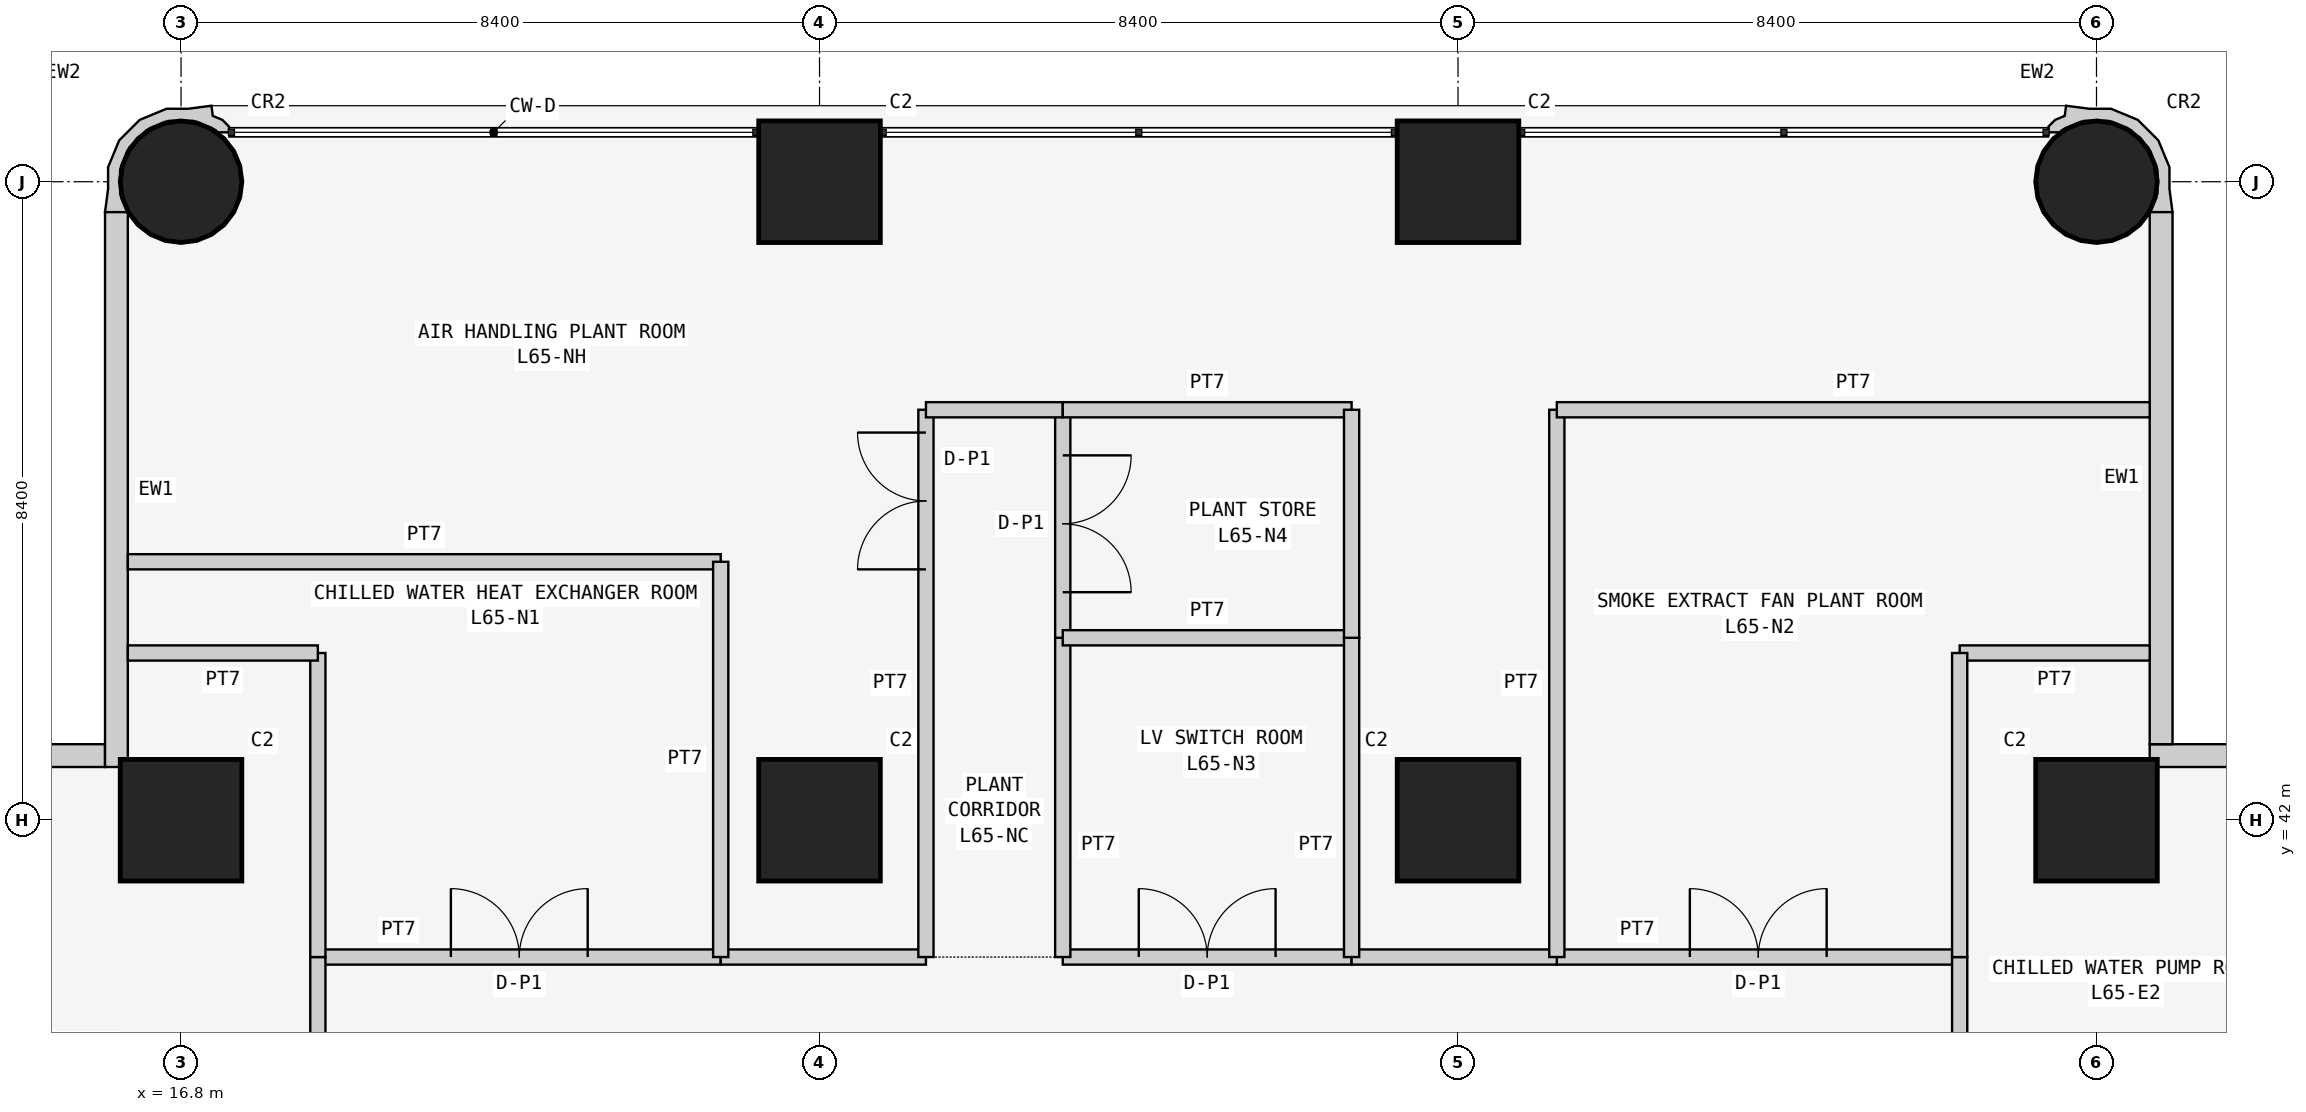
"""IFC4 building model, lengths in metres.
Left out: names, types, materials, properties, quantities, classifications, styles, units other than length and angle.
Written with IfcOpenShell. Run it as: python <this file> out.ifc"""

import sys

from ifc_helpers import new_model, si_unit, direction, frame, frame_2d, origin, origin_2d, place, context, subcontext, project, spatial, polyline, rectangle, circle, outline, extrude, element, fill, save


model = new_model("IFC4")
c1 = context("Model", 3, precision=1e-05, world=origin(), true_north=direction((0.0, 1.0)))
c2 = subcontext(c1, "Body", "Model", "MODEL_VIEW")
j1 = project(units=[si_unit("LENGTHUNIT", "METRE"), si_unit("PLANEANGLEUNIT", "RADIAN")], contexts=[c1])
p1 = place(None, origin())
s1 = spatial("IfcSite", under=j1, at=p1, CompositionType="ELEMENT")
p2 = place(p1, origin())
s2 = spatial("IfcBuilding", under=s1, at=p2, CompositionType="ELEMENT")
p3 = place(p2, frame((0.0, 0.0, 248.1)))
s3 = spatial("IfcBuildingStorey", under=s2, at=p3, CompositionType="ELEMENT", Elevation=248.1)
p4 = place(p3, frame((16.8, 42.0, 0.0), z_axis=(0.0, 0.0, 1.0), x_axis=(1.0, 0.0, 0.0)))
e1 = element("IfcColumn", 1, at=p4, inside=s3, PredefinedType="COLUMN", context=c2, shape_type="SweptSolid", body=[
    extrude(rectangle(XDim=1.6, YDim=1.6, at=origin_2d()), origin(), (0.0, 0.0, 1.0), 6.0),
])
p5 = place(p3, frame((16.8, 50.4, 0.0), z_axis=(0.0, 0.0, 1.0), x_axis=(1.0, 0.0, 0.0)))
e2 = element("IfcColumn", 2, at=p5, inside=s3, PredefinedType="COLUMN", context=c2, shape_type="SweptSolid", body=[
    extrude(circle(Radius=0.8, at=origin_2d()), origin(), (0.0, 0.0, 1.0), 6.0),
])
for number, where, z_axis, x_axis in (
    (3, (25.2, 42.0, 0.0), (0.0, 0.0, 1.0), (1.0, 0.0, 0.0)),
    (4, (25.2, 50.4, 0.0), (0.0, 0.0, 1.0), (1.0, 0.0, 0.0)),
    (5, (33.6, 42.0, 0.0), (0.0, 0.0, 1.0), (1.0, 0.0, 0.0)),
    (6, (33.6, 50.4, 0.0), (0.0, 0.0, 1.0), (1.0, 0.0, 0.0)),
    (7, (42.0, 42.0, 0.0), (0.0, 0.0, 1.0), (1.0, 0.0, 0.0)),
):
    element("IfcColumn", number, at=place(p3, frame(where, z_axis=z_axis, x_axis=x_axis)), inside=s3, PredefinedType="COLUMN", context=c2, shape_type="SweptSolid", body=[
        extrude(rectangle(XDim=1.6, YDim=1.6, at=origin_2d()), origin(), (0.0, 0.0, 1.0), 6.0),
    ])
p6 = place(p3, frame((42.0, 50.4, 0.0), z_axis=(0.0, 0.0, 1.0), x_axis=(1.0, 0.0, 0.0)))
e8 = element("IfcColumn", 8, at=p6, inside=s3, PredefinedType="COLUMN", context=c2, shape_type="SweptSolid", body=[
    extrude(circle(Radius=0.8, at=origin_2d()), origin(), (0.0, 0.0, 1.0), 6.0),
])
p7 = place(p3, frame((15.8, 42.85, 0.0), z_axis=(0.0, 0.0, 1.0), x_axis=(-1.0, 0.0, 0.0)))
e9 = element("IfcWall", 9, at=p7, inside=s3, PredefinedType="SOLIDWALL", context=c2, shape_type="SweptSolid", body=[
    extrude(rectangle(XDim=15.4, YDim=0.3, at=frame_2d((7.7, 0.0))), origin(), (0.0, 0.0, 1.0), 5.85),
])
p8 = place(p3, frame((50.0, 42.85, 0.0), z_axis=(0.0, 0.0, 1.0), x_axis=(-1.0, 0.0, 0.0)))
e10 = element("IfcWall", 10, at=p8, inside=s3, PredefinedType="SOLIDWALL", context=c2, shape_type="SweptSolid", body=[
    extrude(rectangle(XDim=7.3, YDim=0.3, at=frame_2d((3.65, 0.0))), origin(), (0.0, 0.0, 1.0), 5.85),
])
p9 = place(p3, frame((42.85, 43.0, 0.0), z_axis=(0.0, 0.0, 1.0), x_axis=(0.0, 1.0, 0.0)))
e11 = element("IfcWall", 11, at=p9, inside=s3, PredefinedType="SOLIDWALL", context=c2, shape_type="SweptSolid", body=[
    extrude(rectangle(XDim=7.0, YDim=0.3, at=frame_2d((3.5, 0.0))), origin(), (0.0, 0.0, 1.0), 5.85),
])
p10 = place(p3, frame((15.95, 50.0, 0.0), z_axis=(0.0, 0.0, 1.0), x_axis=(0.0, -1.0, 0.0)))
e12 = element("IfcWall", 12, at=p10, inside=s3, PredefinedType="SOLIDWALL", context=c2, shape_type="SweptSolid", body=[
    extrude(rectangle(XDim=7.3, YDim=0.3, at=frame_2d((3.65, 0.0))), origin(), (0.0, 0.0, 1.0), 5.85),
])
p11 = place(p3, frame((42.817, 50.073, 0.0), z_axis=(0.0, 0.0, 1.0), x_axis=(0.34958262992, 0.936905536785, 0.0)))
e13 = element("IfcWall", 13, at=p11, inside=s3, PredefinedType="SOLIDWALL", context=c2, shape_type="SweptSolid", body=[
    extrude(outline(polyline([(0.266, -0.053), (0.535, 0.047), (0.815, 0.307), (0.973, 0.655), (0.987, 1.037), (0.886, 1.306), (0.818, 1.604), (0.686, 1.574), (0.593, 1.674), (0.481, 1.725), (0.409, 1.698), (0.461, 1.559), (0.498, 1.542), (0.715, 1.309), (0.827, 1.011), (0.815, 0.692), (0.683, 0.402), (0.45, 0.185), (0.151, 0.074), (-0.117, 0.083), (-0.128, 0.077), (-0.147, 0.07), (-0.005, -0.197), (0.266, -0.053)])), origin(), (0.0, 0.0, 1.0), 5.85),
])
p12 = place(p3, frame((17.377, 51.065, 0.0), z_axis=(0.0, 0.0, 1.0), x_axis=(-0.34958262992, 0.936905536785, 0.0)))
e14 = element("IfcWall", 14, at=p12, inside=s3, PredefinedType="SOLIDWALL", context=c2, shape_type="SweptSolid", body=[
    extrude(outline(polyline([(0.151, -0.021), (0.244, 0.079), (0.376, 0.048), (0.445, 0.347), (0.545, 0.616), (0.532, 0.998), (0.373, 1.345), (0.094, 1.605), (-0.176, 1.706), (-0.446, 1.849), (-0.588, 1.582), (-0.57, 1.575), (-0.558, 1.569), (-0.29, 1.579), (0.008, 1.467), (0.242, 1.25), (0.374, 0.961), (0.385, 0.642), (0.274, 0.344), (0.057, 0.11), (0.019, 0.093), (-0.033, -0.046), (0.039, -0.072), (0.151, -0.021)])), origin(), (0.0, 0.0, 1.0), 5.85),
])
p13 = place(p3, frame((18.6, 40.2, 0.0), z_axis=(0.0, 0.0, 1.0), x_axis=(1.0, 0.0, 0.0)))
e15 = element("IfcWall", 15, at=p13, inside=s3, PredefinedType="PARTITIONING", context=c2, shape_type="SweptSolid", body=[
    extrude(rectangle(XDim=5.3, YDim=0.2, at=frame_2d((2.65, 0.0))), origin(), (0.0, 0.0, 1.0), 5.85),
])
p14 = place(p13, frame((1.75, 0.0, 0.0)))
e16 = element("IfcOpeningElement", 16, at=p14, cuts=e15, PredefinedType="OPENING", context=c2, shape_type="SweptSolid", body=[
    extrude(rectangle(XDim=1.8, YDim=2.4, at=frame_2d((0.9, 1.2))), frame((0.0, 0.11, 0.0), z_axis=(0.0, -1.0, 0.0), x_axis=(1.0, 0.0, 0.0)), (0.0, 0.0, 1.0), 0.22),
])
p15 = place(p3, frame((34.9, 40.2, 0.0), z_axis=(0.0, 0.0, 1.0), x_axis=(1.0, 0.0, 0.0)))
e17 = element("IfcWall", 17, at=p15, inside=s3, PredefinedType="PARTITIONING", context=c2, shape_type="SweptSolid", body=[
    extrude(rectangle(XDim=5.3, YDim=0.2, at=frame_2d((2.65, 0.0))), origin(), (0.0, 0.0, 1.0), 5.85),
])
p16 = place(p15, frame((1.75, 0.0, 0.0)))
e18 = element("IfcOpeningElement", 18, at=p16, cuts=e17, PredefinedType="OPENING", context=c2, shape_type="SweptSolid", body=[
    extrude(rectangle(XDim=1.8, YDim=2.4, at=frame_2d((0.9, 1.2))), frame((0.0, 0.11, 0.0), z_axis=(0.0, -1.0, 0.0), x_axis=(1.0, 0.0, 0.0)), (0.0, 0.0, 1.0), 0.22),
])
p17 = place(p3, frame((28.4, 40.2, 0.0), z_axis=(0.0, 0.0, 1.0), x_axis=(1.0, 0.0, 0.0)))
e19 = element("IfcWall", 19, at=p17, inside=s3, PredefinedType="PARTITIONING", context=c2, shape_type="SweptSolid", body=[
    extrude(rectangle(XDim=3.8, YDim=0.2, at=frame_2d((1.9, 0.0))), origin(), (0.0, 0.0, 1.0), 5.85),
])
p18 = place(p17, frame((1.0, 0.0, 0.0)))
e20 = element("IfcOpeningElement", 20, at=p18, cuts=e19, PredefinedType="OPENING", context=c2, shape_type="SweptSolid", body=[
    extrude(rectangle(XDim=1.8, YDim=2.4, at=frame_2d((0.9, 1.2))), frame((0.0, 0.11, 0.0), z_axis=(0.0, -1.0, 0.0), x_axis=(1.0, 0.0, 0.0)), (0.0, 0.0, 1.0), 0.22),
])
p19 = place(p3, frame((23.9, 40.2, 0.0), z_axis=(0.0, 0.0, 1.0), x_axis=(1.0, 0.0, 0.0)))
e21 = element("IfcWall", 21, at=p19, inside=s3, PredefinedType="PARTITIONING", context=c2, shape_type="SweptSolid", body=[
    extrude(rectangle(XDim=2.7, YDim=0.2, at=frame_2d((1.35, 0.0))), origin(), (0.0, 0.0, 1.0), 5.85),
])
p20 = place(p3, frame((32.2, 40.2, 0.0), z_axis=(0.0, 0.0, 1.0), x_axis=(1.0, 0.0, 0.0)))
e22 = element("IfcWall", 22, at=p20, inside=s3, PredefinedType="PARTITIONING", context=c2, shape_type="SweptSolid", body=[
    extrude(rectangle(XDim=2.7, YDim=0.2, at=frame_2d((1.35, 0.0))), origin(), (0.0, 0.0, 1.0), 5.85),
])
p21 = place(p3, frame((40.2, 40.2, 0.0), z_axis=(0.0, 0.0, 1.0), x_axis=(0.0, -1.0, 0.0)))
e23 = element("IfcWall", 23, at=p21, inside=s3, PredefinedType="PARTITIONING", context=c2, shape_type="SweptSolid", body=[
    extrude(rectangle(XDim=5.3, YDim=0.2, at=frame_2d((2.65, 0.0))), origin(), (0.0, 0.0, 1.0), 5.85),
])
p22 = place(p21, frame((1.75, 0.0, 0.0)))
e24 = element("IfcOpeningElement", 24, at=p22, cuts=e23, PredefinedType="OPENING", context=c2, shape_type="SweptSolid", body=[
    extrude(rectangle(XDim=1.8, YDim=2.4, at=frame_2d((0.9, 1.2))), frame((0.0, 0.11, 0.0), z_axis=(0.0, -1.0, 0.0), x_axis=(1.0, 0.0, 0.0)), (0.0, 0.0, 1.0), 0.22),
])
p23 = place(p3, frame((18.6, 34.9, 0.0), z_axis=(0.0, 0.0, 1.0), x_axis=(0.0, 1.0, 0.0)))
e25 = element("IfcWall", 25, at=p23, inside=s3, PredefinedType="PARTITIONING", context=c2, shape_type="SweptSolid", body=[
    extrude(rectangle(XDim=5.3, YDim=0.2, at=frame_2d((2.65, 0.0))), origin(), (0.0, 0.0, 1.0), 5.85),
])
p24 = place(p23, frame((1.75, 0.0, 0.0)))
e26 = element("IfcOpeningElement", 26, at=p24, cuts=e25, PredefinedType="OPENING", context=c2, shape_type="SweptSolid", body=[
    extrude(rectangle(XDim=1.8, YDim=2.4, at=frame_2d((0.9, 1.2))), frame((0.0, 0.11, 0.0), z_axis=(0.0, -1.0, 0.0), x_axis=(1.0, 0.0, 0.0)), (0.0, 0.0, 1.0), 0.22),
])
p25 = place(p3, frame((16.1, 45.4, 0.0), z_axis=(0.0, 0.0, 1.0), x_axis=(1.0, 0.0, 0.0)))
e27 = element("IfcWall", 27, at=p25, inside=s3, PredefinedType="PARTITIONING", context=c2, shape_type="SweptSolid", body=[
    extrude(rectangle(XDim=7.8, YDim=0.2, at=frame_2d((3.9, 0.0))), origin(), (0.0, 0.0, 1.0), 5.85),
])
p26 = place(p3, frame((23.9, 45.4, 0.0), z_axis=(0.0, 0.0, 1.0), x_axis=(0.0, -1.0, 0.0)))
e28 = element("IfcWall", 28, at=p26, inside=s3, PredefinedType="PARTITIONING", context=c2, shape_type="SweptSolid", body=[
    extrude(rectangle(XDim=5.2, YDim=0.2, at=frame_2d((2.6, 0.0))), origin(), (0.0, 0.0, 1.0), 5.85),
])
p27 = place(p3, frame((18.6, 40.2, 0.0), z_axis=(0.0, 0.0, 1.0), x_axis=(0.0, 1.0, 0.0)))
e29 = element("IfcWall", 29, at=p27, inside=s3, PredefinedType="PARTITIONING", context=c2, shape_type="SweptSolid", body=[
    extrude(rectangle(XDim=4.0, YDim=0.2, at=frame_2d((2.0, 0.0))), origin(), (0.0, 0.0, 1.0), 5.85),
])
p28 = place(p3, frame((18.6, 44.2, 0.0), z_axis=(0.0, 0.0, 1.0), x_axis=(-1.0, 0.0, 0.0)))
e30 = element("IfcWall", 30, at=p28, inside=s3, PredefinedType="PARTITIONING", context=c2, shape_type="SweptSolid", body=[
    extrude(rectangle(XDim=2.5, YDim=0.2, at=frame_2d((1.25, 0.0))), origin(), (0.0, 0.0, 1.0), 5.85),
])
p29 = place(p3, frame((34.9, 40.2, 0.0), z_axis=(0.0, 0.0, 1.0), x_axis=(0.0, 1.0, 0.0)))
e31 = element("IfcWall", 31, at=p29, inside=s3, PredefinedType="PARTITIONING", context=c2, shape_type="SweptSolid", body=[
    extrude(rectangle(XDim=7.2, YDim=0.2, at=frame_2d((3.6, 0.0))), origin(), (0.0, 0.0, 1.0), 5.85),
])
p30 = place(p3, frame((34.9, 47.4, 0.0), z_axis=(0.0, 0.0, 1.0), x_axis=(1.0, 0.0, 0.0)))
e32 = element("IfcWall", 32, at=p30, inside=s3, PredefinedType="PARTITIONING", context=c2, shape_type="SweptSolid", body=[
    extrude(rectangle(XDim=7.8, YDim=0.2, at=frame_2d((3.9, 0.0))), origin(), (0.0, 0.0, 1.0), 5.85),
])
p31 = place(p3, frame((42.7, 44.2, 0.0), z_axis=(0.0, 0.0, 1.0), x_axis=(-1.0, 0.0, 0.0)))
e33 = element("IfcWall", 33, at=p31, inside=s3, PredefinedType="PARTITIONING", context=c2, shape_type="SweptSolid", body=[
    extrude(rectangle(XDim=2.5, YDim=0.2, at=frame_2d((1.25, 0.0))), origin(), (0.0, 0.0, 1.0), 5.85),
])
p32 = place(p3, frame((40.2, 44.2, 0.0), z_axis=(0.0, 0.0, 1.0), x_axis=(0.0, -1.0, 0.0)))
e34 = element("IfcWall", 34, at=p32, inside=s3, PredefinedType="PARTITIONING", context=c2, shape_type="SweptSolid", body=[
    extrude(rectangle(XDim=4.0, YDim=0.2, at=frame_2d((2.0, 0.0))), origin(), (0.0, 0.0, 1.0), 5.85),
])
p33 = place(p3, frame((28.4, 44.4, 0.0), z_axis=(0.0, 0.0, 1.0), x_axis=(0.0, -1.0, 0.0)))
e35 = element("IfcWall", 35, at=p33, inside=s3, PredefinedType="PARTITIONING", context=c2, shape_type="SweptSolid", body=[
    extrude(rectangle(XDim=4.2, YDim=0.2, at=frame_2d((2.1, 0.0))), origin(), (0.0, 0.0, 1.0), 5.85),
])
p34 = place(p3, frame((28.4, 47.4, 0.0), z_axis=(0.0, 0.0, 1.0), x_axis=(0.0, -1.0, 0.0)))
e36 = element("IfcWall", 36, at=p34, inside=s3, PredefinedType="PARTITIONING", context=c2, shape_type="SweptSolid", body=[
    extrude(rectangle(XDim=3.0, YDim=0.2, at=frame_2d((1.5, 0.0))), origin(), (0.0, 0.0, 1.0), 5.85),
])
p35 = place(p34, frame((0.6, 0.0, 0.0)))
e37 = element("IfcOpeningElement", 37, at=p35, cuts=e36, PredefinedType="OPENING", context=c2, shape_type="SweptSolid", body=[
    extrude(rectangle(XDim=1.8, YDim=2.4, at=frame_2d((0.9, 1.2))), frame((0.0, 0.11, 0.0), z_axis=(0.0, -1.0, 0.0), x_axis=(1.0, 0.0, 0.0)), (0.0, 0.0, 1.0), 0.22),
])
p36 = place(p3, frame((26.6, 40.2, 0.0), z_axis=(0.0, 0.0, 1.0), x_axis=(0.0, 1.0, 0.0)))
e38 = element("IfcWall", 38, at=p36, inside=s3, PredefinedType="PARTITIONING", context=c2, shape_type="SweptSolid", body=[
    extrude(rectangle(XDim=7.2, YDim=0.2, at=frame_2d((3.6, 0.0))), origin(), (0.0, 0.0, 1.0), 5.85),
])
p37 = place(p36, frame((5.1, 0.0, 0.0)))
e39 = element("IfcOpeningElement", 39, at=p37, cuts=e38, PredefinedType="OPENING", context=c2, shape_type="SweptSolid", body=[
    extrude(rectangle(XDim=1.8, YDim=2.4, at=frame_2d((0.9, 1.2))), frame((0.0, 0.11, 0.0), z_axis=(0.0, -1.0, 0.0), x_axis=(1.0, 0.0, 0.0)), (0.0, 0.0, 1.0), 0.22),
])
p38 = place(p3, frame((26.6, 47.4, 0.0), z_axis=(0.0, 0.0, 1.0), x_axis=(1.0, 0.0, 0.0)))
e40 = element("IfcWall", 40, at=p38, inside=s3, PredefinedType="PARTITIONING", context=c2, shape_type="SweptSolid", body=[
    extrude(rectangle(XDim=1.8, YDim=0.2, at=frame_2d((0.9, 0.0))), origin(), (0.0, 0.0, 1.0), 5.85),
])
p39 = place(p3, frame((28.4, 44.4, 0.0), z_axis=(0.0, 0.0, 1.0), x_axis=(1.0, 0.0, 0.0)))
e41 = element("IfcWall", 41, at=p39, inside=s3, PredefinedType="PARTITIONING", context=c2, shape_type="SweptSolid", body=[
    extrude(rectangle(XDim=3.8, YDim=0.2, at=frame_2d((1.9, 0.0))), origin(), (0.0, 0.0, 1.0), 5.85),
])
p40 = place(p3, frame((32.2, 44.4, 0.0), z_axis=(0.0, 0.0, 1.0), x_axis=(0.0, -1.0, 0.0)))
e42 = element("IfcWall", 42, at=p40, inside=s3, PredefinedType="PARTITIONING", context=c2, shape_type="SweptSolid", body=[
    extrude(rectangle(XDim=4.2, YDim=0.2, at=frame_2d((2.1, 0.0))), origin(), (0.0, 0.0, 1.0), 5.85),
])
p41 = place(p3, frame((28.4, 47.4, 0.0), z_axis=(0.0, 0.0, 1.0), x_axis=(1.0, 0.0, 0.0)))
e43 = element("IfcWall", 43, at=p41, inside=s3, PredefinedType="PARTITIONING", context=c2, shape_type="SweptSolid", body=[
    extrude(rectangle(XDim=3.8, YDim=0.2, at=frame_2d((1.9, 0.0))), origin(), (0.0, 0.0, 1.0), 5.85),
])
p42 = place(p3, frame((32.2, 47.4, 0.0), z_axis=(0.0, 0.0, 1.0), x_axis=(0.0, -1.0, 0.0)))
e44 = element("IfcWall", 44, at=p42, inside=s3, PredefinedType="PARTITIONING", context=c2, shape_type="SweptSolid", body=[
    extrude(rectangle(XDim=3.0, YDim=0.2, at=frame_2d((1.5, 0.0))), origin(), (0.0, 0.0, 1.0), 5.85),
])
p43 = place(p14, origin())
e45 = element("IfcDoor", 45, at=p43, inside=s3, OperationType="DOUBLE_DOOR_SINGLE_SWING", PredefinedType="DOOR", context=c2, shape_type="SweptSolid", body=[
    extrude(rectangle(XDim=1.8, YDim=2.4, at=frame_2d((0.9, 1.2))), frame((0.0, 0.025, 0.0), z_axis=(0.0, -1.0, 0.0), x_axis=(1.0, 0.0, 0.0)), (0.0, 0.0, 1.0), 0.05),
])
fill(e16, e45)
p44 = place(p16, origin())
e46 = element("IfcDoor", 46, at=p44, inside=s3, OperationType="DOUBLE_DOOR_SINGLE_SWING", PredefinedType="DOOR", context=c2, shape_type="SweptSolid", body=[
    extrude(rectangle(XDim=1.8, YDim=2.4, at=frame_2d((0.9, 1.2))), frame((0.0, 0.025, 0.0), z_axis=(0.0, -1.0, 0.0), x_axis=(1.0, 0.0, 0.0)), (0.0, 0.0, 1.0), 0.05),
])
fill(e18, e46)
p45 = place(p18, origin())
e47 = element("IfcDoor", 47, at=p45, inside=s3, OperationType="DOUBLE_DOOR_SINGLE_SWING", PredefinedType="DOOR", context=c2, shape_type="SweptSolid", body=[
    extrude(rectangle(XDim=1.8, YDim=2.4, at=frame_2d((0.9, 1.2))), frame((0.0, 0.025, 0.0), z_axis=(0.0, -1.0, 0.0), x_axis=(1.0, 0.0, 0.0)), (0.0, 0.0, 1.0), 0.05),
])
fill(e20, e47)
p46 = place(p35, origin())
e48 = element("IfcDoor", 48, at=p46, inside=s3, OperationType="DOUBLE_DOOR_SINGLE_SWING", PredefinedType="DOOR", context=c2, shape_type="SweptSolid", body=[
    extrude(rectangle(XDim=1.8, YDim=2.4, at=frame_2d((0.9, 1.2))), frame((0.0, 0.025, 0.0), z_axis=(0.0, -1.0, 0.0), x_axis=(1.0, 0.0, 0.0)), (0.0, 0.0, 1.0), 0.05),
])
fill(e37, e48)
p47 = place(p37, origin())
e49 = element("IfcDoor", 49, at=p47, inside=s3, OperationType="DOUBLE_DOOR_SINGLE_SWING", PredefinedType="DOOR", context=c2, shape_type="SweptSolid", body=[
    extrude(rectangle(XDim=1.8, YDim=2.4, at=frame_2d((0.9, 1.2))), frame((0.0, 0.025, 0.0), z_axis=(0.0, -1.0, 0.0), x_axis=(1.0, 0.0, 0.0)), (0.0, 0.0, 1.0), 0.05),
])
fill(e39, e49)
save(model, sys.argv[1])
